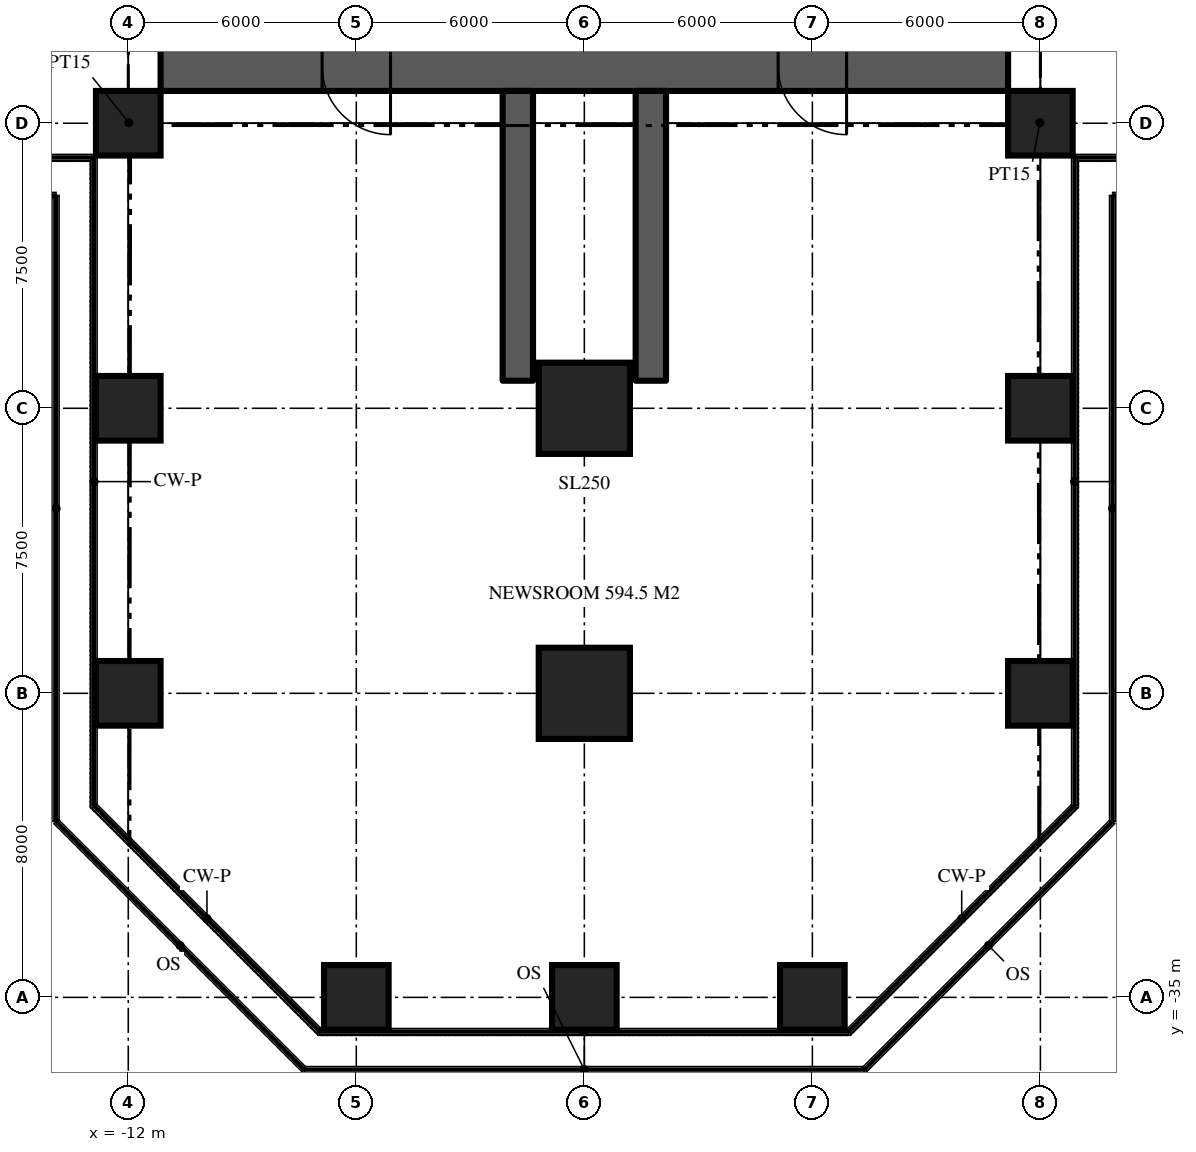
"""IFC4 building model, lengths in metres.
Left out: names, types, materials, properties, quantities, classifications, styles, units other than length and angle.
Written with IfcOpenShell. Run it as: python <this file> out.ifc"""

import sys

from ifc_helpers import new_model, si_unit, direction, frame, frame_2d, origin, origin_2d, place, context, subcontext, project, spatial, rectangle, extrude, element, fill, save


model = new_model("IFC4")
c1 = context("Model", 3, precision=1e-05, world=origin(), true_north=direction((0.0, 1.0)))
c2 = subcontext(c1, "Body", "Model", "MODEL_VIEW")
j1 = project(units=[si_unit("LENGTHUNIT", "METRE"), si_unit("PLANEANGLEUNIT", "RADIAN")], contexts=[c1])
p1 = place(None, origin())
s1 = spatial("IfcSite", under=j1, at=p1, CompositionType="ELEMENT")
p2 = place(p1, origin())
s2 = spatial("IfcBuilding", under=s1, at=p2, CompositionType="ELEMENT")
p3 = place(p2, frame((0.0, 0.0, 28.0)))
s3 = spatial("IfcBuildingStorey", under=s2, at=p3, CompositionType="ELEMENT", Elevation=28.0)
p4 = place(p3, frame((11.15, -10.5, 0.0), z_axis=(0.0, 0.0, 1.0), x_axis=(-1.0, 0.0, 0.0)))
e1 = element("IfcWall", 1, at=p4, inside=s3, PredefinedType="SHEAR", context=c2, shape_type="SweptSolid", body=[
    extrude(rectangle(XDim=22.3, YDim=1.3, at=frame_2d((11.15, 0.0))), origin(), (0.0, 0.0, 1.0), 5.0),
])
p5 = place(p4, frame((16.25, 0.0, 0.0)))
e2 = element("IfcOpeningElement", 2, at=p5, cuts=e1, PredefinedType="OPENING", context=c2, shape_type="SweptSolid", body=[
    extrude(rectangle(XDim=1.8, YDim=2.2, at=frame_2d((0.9, 1.1))), frame((0.0, 0.66, 0.0), z_axis=(0.0, -1.0, 0.0), x_axis=(1.0, 0.0, 0.0)), (0.0, 0.0, 1.0), 1.32),
])
p6 = place(p4, frame((4.25, 0.0, 0.0)))
e3 = element("IfcOpeningElement", 3, at=p6, cuts=e1, PredefinedType="OPENING", context=c2, shape_type="SweptSolid", body=[
    extrude(rectangle(XDim=1.8, YDim=2.2, at=frame_2d((0.9, 1.1))), frame((0.0, 0.66, 0.0), z_axis=(0.0, -1.0, 0.0), x_axis=(1.0, 0.0, 0.0)), (0.0, 0.0, 1.0), 1.32),
])
for number, where, z_axis, x_axis in (
    (4, (-1.75, -11.15, 0.0), (0.0, 0.0, 1.0), (0.0, -1.0, 0.0)),
    (5, (1.75, -11.15, 0.0), (0.0, 0.0, 1.0), (0.0, -1.0, 0.0)),
):
    element("IfcWall", number, at=place(p3, frame(where, z_axis=z_axis, x_axis=x_axis)), inside=s3, PredefinedType="SHEAR", context=c2, shape_type="SweptSolid", body=[
        extrude(rectangle(XDim=7.625, YDim=0.8, at=frame_2d((3.812, 0.0))), origin(), (0.0, 0.0, 1.0), 5.0),
    ])
for number, where, z_axis, x_axis in (
    (6, (-6.0, -35.0, 0.0), (0.0, 0.0, 1.0), (1.0, 0.0, 0.0)),
    (7, (0.0, -35.0, 0.0), (0.0, 0.0, 1.0), (1.0, 0.0, 0.0)),
    (8, (6.0, -35.0, 0.0), (0.0, 0.0, 1.0), (1.0, 0.0, 0.0)),
    (9, (-12.0, -27.0, 0.0), (0.0, 0.0, 1.0), (1.0, 0.0, 0.0)),
):
    element("IfcColumn", number, at=place(p3, frame(where, z_axis=z_axis, x_axis=x_axis)), inside=s3, PredefinedType="COLUMN", context=c2, shape_type="SweptSolid", body=[
        extrude(rectangle(XDim=1.7, YDim=1.7, at=origin_2d()), origin(), (0.0, 0.0, 1.0), 5.0),
    ])
p7 = place(p3, frame((0.0, -27.0, 0.0), z_axis=(0.0, 0.0, 1.0), x_axis=(1.0, 0.0, 0.0)))
e10 = element("IfcColumn", 10, at=p7, inside=s3, PredefinedType="COLUMN", context=c2, shape_type="SweptSolid", body=[
    extrude(rectangle(XDim=2.4, YDim=2.4, at=origin_2d()), origin(), (0.0, 0.0, 1.0), 5.0),
])
for number, where, z_axis, x_axis in (
    (11, (12.0, -27.0, 0.0), (0.0, 0.0, 1.0), (1.0, 0.0, 0.0)),
    (12, (-12.0, -19.5, 0.0), (0.0, 0.0, 1.0), (1.0, 0.0, 0.0)),
):
    element("IfcColumn", number, at=place(p3, frame(where, z_axis=z_axis, x_axis=x_axis)), inside=s3, PredefinedType="COLUMN", context=c2, shape_type="SweptSolid", body=[
        extrude(rectangle(XDim=1.7, YDim=1.7, at=origin_2d()), origin(), (0.0, 0.0, 1.0), 5.0),
    ])
p8 = place(p3, frame((0.0, -19.5, 0.0), z_axis=(0.0, 0.0, 1.0), x_axis=(1.0, 0.0, 0.0)))
e13 = element("IfcColumn", 13, at=p8, inside=s3, PredefinedType="COLUMN", context=c2, shape_type="SweptSolid", body=[
    extrude(rectangle(XDim=2.4, YDim=2.4, at=origin_2d()), origin(), (0.0, 0.0, 1.0), 5.0),
])
for number, where, z_axis, x_axis in (
    (14, (12.0, -19.5, 0.0), (0.0, 0.0, 1.0), (1.0, 0.0, 0.0)),
    (15, (-12.0, -12.0, 0.0), (0.0, 0.0, 1.0), (1.0, 0.0, 0.0)),
    (16, (12.0, -12.0, 0.0), (0.0, 0.0, 1.0), (1.0, 0.0, 0.0)),
):
    element("IfcColumn", number, at=place(p3, frame(where, z_axis=z_axis, x_axis=x_axis)), inside=s3, PredefinedType="COLUMN", context=c2, shape_type="SweptSolid", body=[
        extrude(rectangle(XDim=1.7, YDim=1.7, at=origin_2d()), origin(), (0.0, 0.0, 1.0), 5.0),
    ])
for number, where, z_axis, x_axis in (
    (17, (-11.15, -11.15, 0.0), (0.0, 0.0, 1.0), (-0.707, -0.707, 0.0)),
    (18, (11.15, -11.15, 0.0), (0.0, 0.0, 1.0), (0.707, -0.707, 0.0)),
):
    element("IfcWall", number, at=place(p3, frame(where, z_axis=z_axis, x_axis=x_axis)), inside=s3, PredefinedType="PARTITIONING", context=c2, shape_type="SweptSolid", body=[
        extrude(rectangle(XDim=2.362, YDim=0.15, at=frame_2d((1.181, 0.0))), origin(), (0.0, 0.0, 1.0), 4.75),
    ])
p9 = place(p5, origin())
e19 = element("IfcDoor", 19, at=p9, inside=s3, OperationType="DOUBLE_DOOR_DOUBLE_SWING", PredefinedType="DOOR", context=c2, shape_type="SweptSolid", body=[
    extrude(rectangle(XDim=1.8, YDim=2.2, at=frame_2d((0.9, 1.1))), frame((0.0, 0.025, 0.0), z_axis=(0.0, -1.0, 0.0), x_axis=(1.0, 0.0, 0.0)), (0.0, 0.0, 1.0), 0.05),
])
fill(e2, e19)
p10 = place(p6, origin())
e20 = element("IfcDoor", 20, at=p10, inside=s3, OperationType="DOUBLE_DOOR_DOUBLE_SWING", PredefinedType="DOOR", context=c2, shape_type="SweptSolid", body=[
    extrude(rectangle(XDim=1.8, YDim=2.2, at=frame_2d((0.9, 1.1))), frame((0.0, 0.025, 0.0), z_axis=(0.0, -1.0, 0.0), x_axis=(1.0, 0.0, 0.0)), (0.0, 0.0, 1.0), 0.05),
])
fill(e3, e20)
save(model, sys.argv[1])
